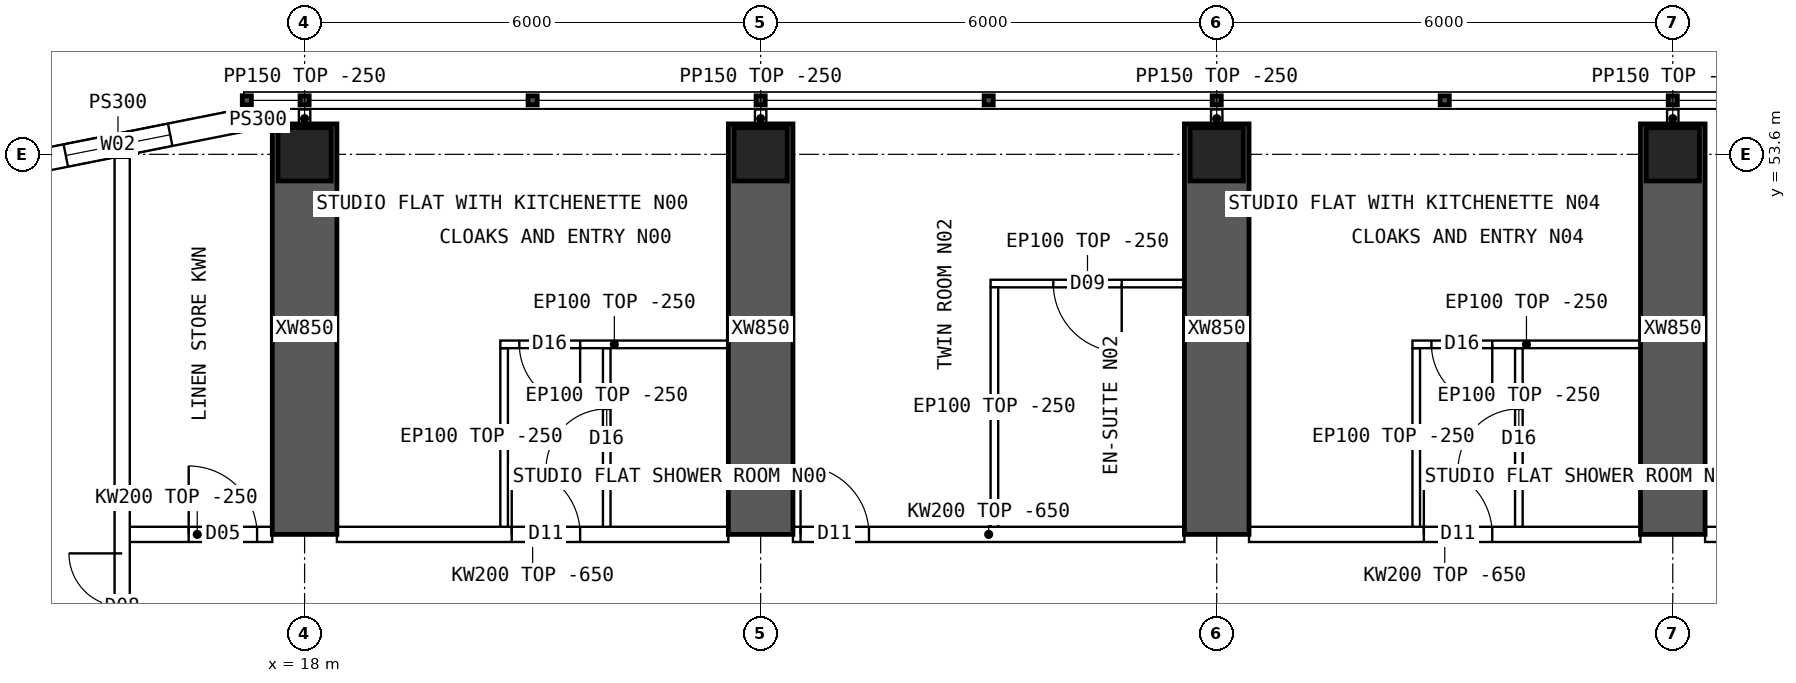
"""IFC4 building model, lengths in metres.
Left out: names, types, materials, properties, quantities, classifications, styles, units other than length and angle.
Written with IfcOpenShell. Run it as: python <this file> out.ifc"""

import sys

from ifc_helpers import new_model, si_unit, direction, frame, frame_2d, origin, origin_2d, place, context, subcontext, project, spatial, polyline, rectangle, hollow_rectangle, outline, extrude, element, fill, save


model = new_model("IFC4")
c1 = context("Model", 3, precision=1e-05, world=origin(), true_north=direction((0.0, 1.0)))
c2 = subcontext(c1, "Body", "Model", "MODEL_VIEW")
j1 = project(units=[si_unit("LENGTHUNIT", "METRE"), si_unit("PLANEANGLEUNIT", "RADIAN")], contexts=[c1])
p1 = place(None, origin())
s1 = spatial("IfcSite", under=j1, at=p1, CompositionType="ELEMENT")
p2 = place(p1, origin())
s2 = spatial("IfcBuilding", under=s1, at=p2, CompositionType="ELEMENT")
p3 = place(p2, frame((0.0, 0.0, 182.35)))
s3 = spatial("IfcBuildingStorey", under=s2, at=p3, CompositionType="ELEMENT", Elevation=182.35)
for number, where, z_axis, x_axis in (
    (1, (18.0, 53.6, 0.0), (0.0, 0.0, 1.0), (1.0, 0.0, 0.0)),
    (2, (24.0, 53.6, 0.0), (0.0, 0.0, 1.0), (1.0, 0.0, 0.0)),
    (3, (30.0, 53.6, 0.0), (0.0, 0.0, 1.0), (1.0, 0.0, 0.0)),
    (4, (36.0, 53.6, 0.0), (0.0, 0.0, 1.0), (1.0, 0.0, 0.0)),
):
    element("IfcColumn", number, at=place(p3, frame(where, z_axis=z_axis, x_axis=x_axis)), inside=s3, PredefinedType="COLUMN", context=c2, shape_type="SweptSolid", body=[
        extrude(hollow_rectangle(XDim=0.7, YDim=0.7, WallThickness=0.07, at=origin_2d()), origin(), (0.0, 0.0, 1.0), 3.75),
    ])
for number, where, z_axis, x_axis in (
    (5, (18.0, 48.6, 0.0), (0.0, 0.0, 1.0), (0.0, 1.0, 0.0)),
    (6, (24.0, 48.6, 0.0), (0.0, 0.0, 1.0), (0.0, 1.0, 0.0)),
    (7, (30.0, 48.6, 0.0), (0.0, 0.0, 1.0), (0.0, 1.0, 0.0)),
    (8, (36.0, 48.6, 0.0), (0.0, 0.0, 1.0), (0.0, 1.0, 0.0)),
):
    element("IfcWall", number, at=place(p3, frame(where, z_axis=z_axis, x_axis=x_axis)), inside=s3, PredefinedType="SHEAR", context=c2, shape_type="SweptSolid", body=[
        extrude(rectangle(XDim=5.4, YDim=0.85, at=frame_2d((2.7, 0.0))), origin(), (0.0, 0.0, 1.0), 3.75),
    ])
p4 = place(p3, frame((17.2, 54.05, 0.0), z_axis=(0.0, 0.0, 1.0), x_axis=(-0.98078325777, -0.195100490205, 0.0)))
e9 = element("IfcWall", 9, at=p4, inside=s3, PredefinedType="SOLIDWALL", context=c2, shape_type="SweptSolid", body=[
    extrude(outline(polyline([(-0.03, -0.15), (3.405, -0.15), (3.345, 0.15), (0.03, 0.15), (-0.03, -0.15)])), origin(), (0.0, 0.0, 1.0), 3.5),
])
p5 = place(p4, frame((0.988, 0.0, 0.9)))
e10 = element("IfcOpeningElement", 10, at=p5, cuts=e9, PredefinedType="OPENING", context=c2, shape_type="SweptSolid", body=[
    extrude(rectangle(XDim=1.4, YDim=1.8, at=frame_2d((0.7, 0.9))), frame((0.0, 0.16, 0.0), z_axis=(0.0, -1.0, 0.0), x_axis=(1.0, 0.0, 0.0)), (0.0, 0.0, 1.0), 0.32),
])
p6 = place(p3, frame((17.2, 54.05, 0.0), z_axis=(0.0, 0.0, 1.0), x_axis=(1.0, 0.0, 0.0)))
e11 = element("IfcWall", 11, at=p6, inside=s3, PredefinedType="SOLIDWALL", context=c2, shape_type="SweptSolid", body=[
    extrude(rectangle(XDim=0.375, YDim=0.3, at=frame_2d((0.188, 0.0))), origin(), (0.0, 0.0, 1.0), 3.5),
])
p7 = place(p3, frame((15.6, 48.6, 0.0), z_axis=(0.0, 0.0, 1.0), x_axis=(1.0, 0.0, 0.0)))
e12 = element("IfcWall", 12, at=p7, inside=s3, PredefinedType="SOLIDWALL", context=c2, shape_type="SweptSolid", body=[
    extrude(rectangle(XDim=1.975, YDim=0.2, at=frame_2d((0.987, 0.0))), origin(), (0.0, 0.0, 1.0), 3.5),
])
p8 = place(p7, frame((0.875, 0.0, 0.0)))
e13 = element("IfcOpeningElement", 13, at=p8, cuts=e12, PredefinedType="OPENING", context=c2, shape_type="SweptSolid", body=[
    extrude(rectangle(XDim=0.9, YDim=2.1, at=frame_2d((0.45, 1.05))), frame((0.0, 0.11, 0.0), z_axis=(0.0, -1.0, 0.0), x_axis=(1.0, 0.0, 0.0)), (0.0, 0.0, 1.0), 0.22),
])
p9 = place(p3, frame((18.425, 48.6, 0.0), z_axis=(0.0, 0.0, 1.0), x_axis=(1.0, 0.0, 0.0)))
e14 = element("IfcWall", 14, at=p9, inside=s3, PredefinedType="SOLIDWALL", context=c2, shape_type="SweptSolid", body=[
    extrude(outline(polyline([(0.0, 0.0), (5.15, 0.0), (5.15, 3.1), (0.0, 3.1), (0.0, 0.0)])), frame((0.0, 0.1, 0.0), z_axis=(0.0, -1.0, 0.0), x_axis=(1.0, 0.0, 0.0)), (0.0, 0.0, 1.0), 0.2),
])
p10 = place(p9, frame((2.3, 0.0, 0.0)))
e15 = element("IfcOpeningElement", 15, at=p10, cuts=e14, PredefinedType="OPENING", context=c2, shape_type="SweptSolid", body=[
    extrude(rectangle(XDim=0.9, YDim=2.1, at=frame_2d((0.45, 1.05))), frame((0.0, 0.11, 0.0), z_axis=(0.0, -1.0, 0.0), x_axis=(1.0, 0.0, 0.0)), (0.0, 0.0, 1.0), 0.22),
])
p11 = place(p3, frame((24.425, 48.6, 0.0), z_axis=(0.0, 0.0, 1.0), x_axis=(1.0, 0.0, 0.0)))
e16 = element("IfcWall", 16, at=p11, inside=s3, PredefinedType="SOLIDWALL", context=c2, shape_type="SweptSolid", body=[
    extrude(outline(polyline([(0.0, 0.0), (5.15, 0.0), (5.15, 3.1), (0.0, 3.1), (0.0, 0.0)])), frame((0.0, 0.1, 0.0), z_axis=(0.0, -1.0, 0.0), x_axis=(1.0, 0.0, 0.0)), (0.0, 0.0, 1.0), 0.2),
])
p12 = place(p11, frame((0.1, 0.0, 0.0)))
e17 = element("IfcOpeningElement", 17, at=p12, cuts=e16, PredefinedType="OPENING", context=c2, shape_type="SweptSolid", body=[
    extrude(rectangle(XDim=0.9, YDim=2.1, at=frame_2d((0.45, 1.05))), frame((0.0, 0.11, 0.0), z_axis=(0.0, -1.0, 0.0), x_axis=(1.0, 0.0, 0.0)), (0.0, 0.0, 1.0), 0.22),
])
p13 = place(p3, frame((30.425, 48.6, 0.0), z_axis=(0.0, 0.0, 1.0), x_axis=(1.0, 0.0, 0.0)))
e18 = element("IfcWall", 18, at=p13, inside=s3, PredefinedType="SOLIDWALL", context=c2, shape_type="SweptSolid", body=[
    extrude(outline(polyline([(0.0, 0.0), (5.15, 0.0), (5.15, 3.1), (0.0, 3.1), (0.0, 0.0)])), frame((0.0, 0.1, 0.0), z_axis=(0.0, -1.0, 0.0), x_axis=(1.0, 0.0, 0.0)), (0.0, 0.0, 1.0), 0.2),
])
p14 = place(p13, frame((2.3, 0.0, 0.0)))
e19 = element("IfcOpeningElement", 19, at=p14, cuts=e18, PredefinedType="OPENING", context=c2, shape_type="SweptSolid", body=[
    extrude(rectangle(XDim=0.9, YDim=2.1, at=frame_2d((0.45, 1.05))), frame((0.0, 0.11, 0.0), z_axis=(0.0, -1.0, 0.0), x_axis=(1.0, 0.0, 0.0)), (0.0, 0.0, 1.0), 0.22),
])
p15 = place(p3, frame((36.425, 48.6, 0.0), z_axis=(0.0, 0.0, 1.0), x_axis=(1.0, 0.0, 0.0)))
e20 = element("IfcWall", 20, at=p15, inside=s3, PredefinedType="SOLIDWALL", context=c2, shape_type="SweptSolid", body=[
    extrude(outline(polyline([(0.0, 0.0), (5.15, 0.0), (5.15, 3.1), (0.0, 3.1), (0.0, 0.0)])), frame((0.0, 0.1, 0.0), z_axis=(0.0, -1.0, 0.0), x_axis=(1.0, 0.0, 0.0)), (0.0, 0.0, 1.0), 0.2),
])
p16 = place(p15, frame((0.3, 0.0, 0.0)))
e21 = element("IfcOpeningElement", 21, at=p16, cuts=e20, PredefinedType="OPENING", context=c2, shape_type="SweptSolid", body=[
    extrude(rectangle(XDim=1.0, YDim=2.1, at=frame_2d((0.5, 1.05))), frame((0.0, 0.11, 0.0), z_axis=(0.0, -1.0, 0.0), x_axis=(1.0, 0.0, 0.0)), (0.0, 0.0, 1.0), 0.22),
])
p17 = place(p3, frame((20.575, 51.1, 0.0), z_axis=(0.0, 0.0, 1.0), x_axis=(1.0, 0.0, 0.0)))
e22 = element("IfcWall", 22, at=p17, inside=s3, PredefinedType="PARTITIONING", context=c2, shape_type="SweptSolid", body=[
    extrude(rectangle(XDim=3.0, YDim=0.1, at=frame_2d((1.5, 0.0))), origin(), (0.0, 0.0, 1.0), 3.5),
])
p18 = place(p17, frame((0.25, 0.0, 0.0)))
e23 = element("IfcOpeningElement", 23, at=p18, cuts=e22, PredefinedType="OPENING", context=c2, shape_type="SweptSolid", body=[
    extrude(rectangle(XDim=0.8, YDim=2.1, at=frame_2d((0.4, 1.05))), frame((0.0, 0.06, 0.0), z_axis=(0.0, -1.0, 0.0), x_axis=(1.0, 0.0, 0.0)), (0.0, 0.0, 1.0), 0.12),
])
p19 = place(p3, frame((20.625, 51.05, 0.0), z_axis=(0.0, 0.0, 1.0), x_axis=(0.0, -1.0, 0.0)))
e24 = element("IfcWall", 24, at=p19, inside=s3, PredefinedType="PARTITIONING", context=c2, shape_type="SweptSolid", body=[
    extrude(outline(polyline([(0.0, 0.0), (2.35, 0.0), (2.35, 3.1), (2.302, 3.1), (2.3, 3.5), (0.0, 3.5), (0.0, 0.0)])), frame((0.0, 0.05, 0.0), z_axis=(0.0, -1.0, 0.0), x_axis=(1.0, 0.0, 0.0)), (0.0, 0.0, 1.0), 0.1),
])
p20 = place(p3, frame((21.975, 51.05, 0.0), z_axis=(0.0, 0.0, 1.0), x_axis=(0.0, -1.0, 0.0)))
e25 = element("IfcWall", 25, at=p20, inside=s3, PredefinedType="PARTITIONING", context=c2, shape_type="SweptSolid", body=[
    extrude(outline(polyline([(0.0, 0.0), (2.35, 0.0), (2.35, 3.1), (2.302, 3.1), (2.3, 3.5), (0.0, 3.5), (0.0, 0.0)])), frame((0.0, 0.05, 0.0), z_axis=(0.0, -1.0, 0.0), x_axis=(1.0, 0.0, 0.0)), (0.0, 0.0, 1.0), 0.1),
])
p21 = place(p20, frame((0.8, 0.0, 0.0)))
e26 = element("IfcOpeningElement", 26, at=p21, cuts=e25, PredefinedType="OPENING", context=c2, shape_type="SweptSolid", body=[
    extrude(rectangle(XDim=0.8, YDim=2.1, at=frame_2d((0.4, 1.05))), frame((0.0, 0.06, 0.0), z_axis=(0.0, -1.0, 0.0), x_axis=(1.0, 0.0, 0.0)), (0.0, 0.0, 1.0), 0.12),
])
p22 = place(p3, frame((27.025, 51.9, 0.0), z_axis=(0.0, 0.0, 1.0), x_axis=(1.0, 0.0, 0.0)))
e27 = element("IfcWall", 27, at=p22, inside=s3, PredefinedType="PARTITIONING", context=c2, shape_type="SweptSolid", body=[
    extrude(rectangle(XDim=2.55, YDim=0.1, at=frame_2d((1.275, 0.0))), origin(), (0.0, 0.0, 1.0), 3.5),
])
p23 = place(p22, frame((0.825, 0.0, 0.0)))
e28 = element("IfcOpeningElement", 28, at=p23, cuts=e27, PredefinedType="OPENING", context=c2, shape_type="SweptSolid", body=[
    extrude(rectangle(XDim=0.9, YDim=2.1, at=frame_2d((0.45, 1.05))), frame((0.0, 0.06, 0.0), z_axis=(0.0, -1.0, 0.0), x_axis=(1.0, 0.0, 0.0)), (0.0, 0.0, 1.0), 0.12),
])
p24 = place(p3, frame((27.075, 51.85, 0.0), z_axis=(0.0, 0.0, 1.0), x_axis=(0.0, -1.0, 0.0)))
e29 = element("IfcWall", 29, at=p24, inside=s3, PredefinedType="PARTITIONING", context=c2, shape_type="SweptSolid", body=[
    extrude(outline(polyline([(0.0, 0.0), (3.15, 0.0), (3.15, 3.1), (3.102, 3.1), (3.1, 3.5), (0.0, 3.5), (0.0, 0.0)])), frame((0.0, 0.05, 0.0), z_axis=(0.0, -1.0, 0.0), x_axis=(1.0, 0.0, 0.0)), (0.0, 0.0, 1.0), 0.1),
])
p25 = place(p3, frame((32.575, 51.1, 0.0), z_axis=(0.0, 0.0, 1.0), x_axis=(1.0, 0.0, 0.0)))
e30 = element("IfcWall", 30, at=p25, inside=s3, PredefinedType="PARTITIONING", context=c2, shape_type="SweptSolid", body=[
    extrude(rectangle(XDim=3.0, YDim=0.1, at=frame_2d((1.5, 0.0))), origin(), (0.0, 0.0, 1.0), 3.5),
])
p26 = place(p25, frame((0.25, 0.0, 0.0)))
e31 = element("IfcOpeningElement", 31, at=p26, cuts=e30, PredefinedType="OPENING", context=c2, shape_type="SweptSolid", body=[
    extrude(rectangle(XDim=0.8, YDim=2.1, at=frame_2d((0.4, 1.05))), frame((0.0, 0.06, 0.0), z_axis=(0.0, -1.0, 0.0), x_axis=(1.0, 0.0, 0.0)), (0.0, 0.0, 1.0), 0.12),
])
p27 = place(p3, frame((32.625, 51.05, 0.0), z_axis=(0.0, 0.0, 1.0), x_axis=(0.0, -1.0, 0.0)))
e32 = element("IfcWall", 32, at=p27, inside=s3, PredefinedType="PARTITIONING", context=c2, shape_type="SweptSolid", body=[
    extrude(outline(polyline([(0.0, 0.0), (2.35, 0.0), (2.35, 3.1), (2.302, 3.1), (2.3, 3.5), (0.0, 3.5), (0.0, 0.0)])), frame((0.0, 0.05, 0.0), z_axis=(0.0, -1.0, 0.0), x_axis=(1.0, 0.0, 0.0)), (0.0, 0.0, 1.0), 0.1),
])
p28 = place(p3, frame((33.975, 51.05, 0.0), z_axis=(0.0, 0.0, 1.0), x_axis=(0.0, -1.0, 0.0)))
e33 = element("IfcWall", 33, at=p28, inside=s3, PredefinedType="PARTITIONING", context=c2, shape_type="SweptSolid", body=[
    extrude(outline(polyline([(0.0, 0.0), (2.35, 0.0), (2.35, 3.1), (2.302, 3.1), (2.3, 3.5), (0.0, 3.5), (0.0, 0.0)])), frame((0.0, 0.05, 0.0), z_axis=(0.0, -1.0, 0.0), x_axis=(1.0, 0.0, 0.0)), (0.0, 0.0, 1.0), 0.1),
])
p29 = place(p28, frame((0.8, 0.0, 0.0)))
e34 = element("IfcOpeningElement", 34, at=p29, cuts=e33, PredefinedType="OPENING", context=c2, shape_type="SweptSolid", body=[
    extrude(rectangle(XDim=0.8, YDim=2.1, at=frame_2d((0.4, 1.05))), frame((0.0, 0.06, 0.0), z_axis=(0.0, -1.0, 0.0), x_axis=(1.0, 0.0, 0.0)), (0.0, 0.0, 1.0), 0.12),
])
p30 = place(p3, frame((15.6, 10.446, 0.0), z_axis=(0.0, 0.0, 1.0), x_axis=(0.0, 1.0, 0.0)))
e35 = element("IfcWall", 35, at=p30, inside=s3, PredefinedType="SOLIDWALL", context=c2, shape_type="SweptSolid", body=[
    extrude(rectangle(XDim=43.107, YDim=0.2, at=frame_2d((21.554, 0.0))), origin(), (0.0, 0.0, 1.0), 3.5),
])
p31 = place(p30, frame((5.104, 0.0, 0.0)))
e36 = element("IfcOpeningElement", 36, at=p31, cuts=e35, PredefinedType="OPENING", context=c2, shape_type="SweptSolid", body=[
    extrude(rectangle(XDim=1.4, YDim=2.1, at=frame_2d((0.7, 1.05))), frame((0.0, 0.11, 0.0), z_axis=(0.0, -1.0, 0.0), x_axis=(1.0, 0.0, 0.0)), (0.0, 0.0, 1.0), 0.22),
])
p32 = place(p30, frame((36.504, 0.0, 0.0)))
e37 = element("IfcOpeningElement", 37, at=p32, cuts=e35, PredefinedType="OPENING", context=c2, shape_type="SweptSolid", body=[
    extrude(rectangle(XDim=1.4, YDim=2.1, at=frame_2d((0.7, 1.05))), frame((0.0, 0.11, 0.0), z_axis=(0.0, -1.0, 0.0), x_axis=(1.0, 0.0, 0.0)), (0.0, 0.0, 1.0), 0.22),
])
for number, where, z_axis, x_axis in (
    (38, (18.0, 53.95, 0.0), (0.0, 0.0, 1.0), (0.0, 1.0, 0.0)),
    (39, (24.0, 53.95, 0.0), (0.0, 0.0, 1.0), (0.0, 1.0, 0.0)),
    (40, (30.0, 53.95, 0.0), (0.0, 0.0, 1.0), (0.0, 1.0, 0.0)),
    (41, (36.0, 53.95, 0.0), (0.0, 0.0, 1.0), (0.0, 1.0, 0.0)),
):
    element("IfcWall", number, at=place(p3, frame(where, z_axis=z_axis, x_axis=x_axis)), inside=s3, PredefinedType="PARTITIONING", context=c2, shape_type="SweptSolid", body=[
        extrude(rectangle(XDim=0.24, YDim=0.15, at=frame_2d((0.12, 0.0))), origin(), (0.0, 0.0, 1.0), 3.5),
    ])
p33 = place(p5, origin())
e42 = element("IfcWindow", 42, at=p33, inside=s3, PartitioningType="SINGLE_PANEL", PredefinedType="WINDOW", context=c2, shape_type="SweptSolid", body=[
    extrude(rectangle(XDim=1.4, YDim=1.8, at=frame_2d((0.7, 0.9))), frame((0.0, 0.03, 0.0), z_axis=(0.0, -1.0, 0.0), x_axis=(1.0, 0.0, 0.0)), (0.0, 0.0, 1.0), 0.06),
])
fill(e10, e42)
p34 = place(p18, origin())
e43 = element("IfcDoor", 43, at=p34, inside=s3, OperationType="SINGLE_SWING_RIGHT", PredefinedType="DOOR", context=c2, shape_type="SweptSolid", body=[
    extrude(rectangle(XDim=0.8, YDim=2.1, at=frame_2d((0.4, 1.05))), frame((0.0, 0.025, 0.0), z_axis=(0.0, -1.0, 0.0), x_axis=(1.0, 0.0, 0.0)), (0.0, 0.0, 1.0), 0.05),
])
fill(e23, e43)
p35 = place(p21, origin())
e44 = element("IfcDoor", 44, at=p35, inside=s3, OperationType="SINGLE_SWING_RIGHT", PredefinedType="DOOR", context=c2, shape_type="SweptSolid", body=[
    extrude(rectangle(XDim=0.8, YDim=2.1, at=frame_2d((0.4, 1.05))), frame((0.0, 0.025, 0.0), z_axis=(0.0, -1.0, 0.0), x_axis=(1.0, 0.0, 0.0)), (0.0, 0.0, 1.0), 0.05),
])
fill(e26, e44)
p36 = place(p10, origin())
e45 = element("IfcDoor", 45, at=p36, inside=s3, OperationType="SINGLE_SWING_LEFT", PredefinedType="DOOR", context=c2, shape_type="SweptSolid", body=[
    extrude(rectangle(XDim=0.9, YDim=2.1, at=frame_2d((0.45, 1.05))), frame((0.0, 0.025, 0.0), z_axis=(0.0, -1.0, 0.0), x_axis=(1.0, 0.0, 0.0)), (0.0, 0.0, 1.0), 0.05),
])
fill(e15, e45)
p37 = place(p23, origin())
e46 = element("IfcDoor", 46, at=p37, inside=s3, OperationType="SINGLE_SWING_RIGHT", PredefinedType="DOOR", context=c2, shape_type="SweptSolid", body=[
    extrude(rectangle(XDim=0.9, YDim=2.1, at=frame_2d((0.45, 1.05))), frame((0.0, 0.025, 0.0), z_axis=(0.0, -1.0, 0.0), x_axis=(1.0, 0.0, 0.0)), (0.0, 0.0, 1.0), 0.05),
])
fill(e28, e46)
p38 = place(p12, origin())
e47 = element("IfcDoor", 47, at=p38, inside=s3, OperationType="SINGLE_SWING_LEFT", PredefinedType="DOOR", context=c2, shape_type="SweptSolid", body=[
    extrude(rectangle(XDim=0.9, YDim=2.1, at=frame_2d((0.45, 1.05))), frame((0.0, 0.025, 0.0), z_axis=(0.0, -1.0, 0.0), x_axis=(1.0, 0.0, 0.0)), (0.0, 0.0, 1.0), 0.05),
])
fill(e17, e47)
p39 = place(p26, origin())
e48 = element("IfcDoor", 48, at=p39, inside=s3, OperationType="SINGLE_SWING_RIGHT", PredefinedType="DOOR", context=c2, shape_type="SweptSolid", body=[
    extrude(rectangle(XDim=0.8, YDim=2.1, at=frame_2d((0.4, 1.05))), frame((0.0, 0.025, 0.0), z_axis=(0.0, -1.0, 0.0), x_axis=(1.0, 0.0, 0.0)), (0.0, 0.0, 1.0), 0.05),
])
fill(e31, e48)
p40 = place(p29, origin())
e49 = element("IfcDoor", 49, at=p40, inside=s3, OperationType="SINGLE_SWING_RIGHT", PredefinedType="DOOR", context=c2, shape_type="SweptSolid", body=[
    extrude(rectangle(XDim=0.8, YDim=2.1, at=frame_2d((0.4, 1.05))), frame((0.0, 0.025, 0.0), z_axis=(0.0, -1.0, 0.0), x_axis=(1.0, 0.0, 0.0)), (0.0, 0.0, 1.0), 0.05),
])
fill(e34, e49)
p41 = place(p14, origin())
e50 = element("IfcDoor", 50, at=p41, inside=s3, OperationType="SINGLE_SWING_LEFT", PredefinedType="DOOR", context=c2, shape_type="SweptSolid", body=[
    extrude(rectangle(XDim=0.9, YDim=2.1, at=frame_2d((0.45, 1.05))), frame((0.0, 0.025, 0.0), z_axis=(0.0, -1.0, 0.0), x_axis=(1.0, 0.0, 0.0)), (0.0, 0.0, 1.0), 0.05),
])
fill(e19, e50)
p42 = place(p32, origin())
e51 = element("IfcDoor", 51, at=p42, inside=s3, OperationType="DOUBLE_DOOR_SINGLE_SWING", PredefinedType="DOOR", context=c2, shape_type="SweptSolid", body=[
    extrude(rectangle(XDim=1.4, YDim=2.1, at=frame_2d((0.7, 1.05))), frame((0.0, 0.025, 0.0), z_axis=(0.0, -1.0, 0.0), x_axis=(1.0, 0.0, 0.0)), (0.0, 0.0, 1.0), 0.05),
])
fill(e37, e51)
p43 = place(p8, origin())
e52 = element("IfcDoor", 52, at=p43, inside=s3, OperationType="SINGLE_SWING_LEFT", PredefinedType="DOOR", context=c2, shape_type="SweptSolid", body=[
    extrude(rectangle(XDim=0.9, YDim=2.1, at=frame_2d((0.45, 1.05))), frame((0.0, 0.025, 0.0), z_axis=(0.0, -1.0, 0.0), x_axis=(1.0, 0.0, 0.0)), (0.0, 0.0, 1.0), 0.05),
])
fill(e13, e52)
save(model, sys.argv[1])
